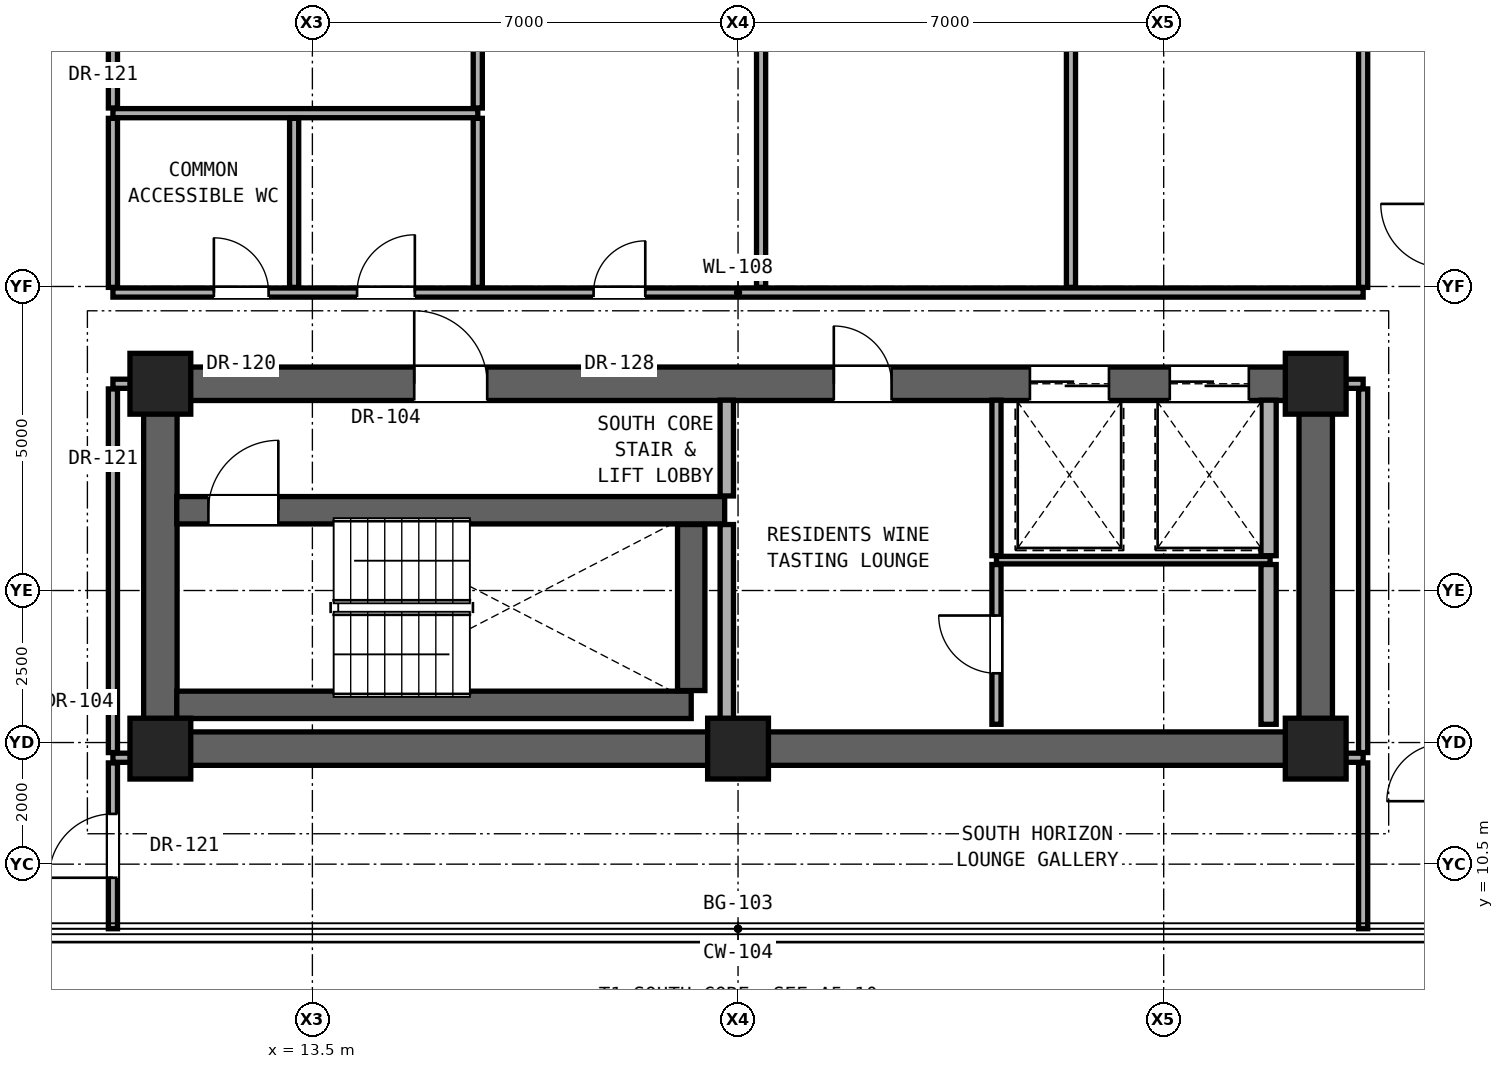
"""IFC4 building model, lengths in metres.
Left out: names, types, materials, properties, quantities, classifications, styles, units other than length and angle.
Written with IfcOpenShell. Run it as: python <this file> out.ifc"""

import sys

from ifc_helpers import new_model, si_unit, direction, frame, frame_2d, origin, origin_2d, place, context, subcontext, project, spatial, rectangle, extrude, element, fill, save


model = new_model("IFC4")
c1 = context("Model", 3, precision=1e-05, world=origin(), true_north=direction((0.0, 1.0)))
c2 = subcontext(c1, "Body", "Model", "MODEL_VIEW")
j1 = project(units=[si_unit("LENGTHUNIT", "METRE"), si_unit("PLANEANGLEUNIT", "RADIAN")], contexts=[c1])
p1 = place(None, origin())
s1 = spatial("IfcSite", under=j1, at=p1, CompositionType="ELEMENT")
p2 = place(p1, origin())
s2 = spatial("IfcBuilding", under=s1, at=p2, CompositionType="ELEMENT")
p3 = place(p2, frame((0.0, 0.0, 167.4)))
s3 = spatial("IfcBuildingStorey", under=s2, at=p3, CompositionType="ELEMENT", Elevation=167.4)
for number, where, z_axis, x_axis in (
    (1, (11.0, 12.4, 0.0), (0.0, 0.0, 1.0), (1.0, 0.0, 0.0)),
    (2, (20.5, 12.4, 0.0), (0.0, 0.0, 1.0), (1.0, 0.0, 0.0)),
    (3, (30.0, 12.4, 0.0), (0.0, 0.0, 1.0), (1.0, 0.0, 0.0)),
    (4, (11.0, 18.4, 0.0), (0.0, 0.0, 1.0), (1.0, 0.0, 0.0)),
    (5, (30.0, 18.4, 0.0), (0.0, 0.0, 1.0), (1.0, 0.0, 0.0)),
):
    element("IfcColumn", number, at=place(p3, frame(where, z_axis=z_axis, x_axis=x_axis)), inside=s3, PredefinedType="COLUMN", context=c2, shape_type="SweptSolid", body=[
        extrude(rectangle(XDim=1.0, YDim=1.0, at=origin_2d()), origin(), (0.0, 0.0, 1.0), 3.25),
    ])
p4 = place(p3, frame((11.0, 12.4, 0.0), z_axis=(0.0, 0.0, 1.0), x_axis=(1.0, 0.0, 0.0)))
e6 = element("IfcWall", 6, at=p4, inside=s3, PredefinedType="SHEAR", context=c2, shape_type="SweptSolid", body=[
    extrude(rectangle(XDim=19.0, YDim=0.55, at=frame_2d((9.5, 0.0))), origin(), (0.0, 0.0, 1.0), 3.05),
])
for number, where, z_axis, x_axis in (
    (7, (11.0, 12.4, 0.0), (0.0, 0.0, 1.0), (0.0, 1.0, 0.0)),
    (8, (30.0, 12.4, 0.0), (0.0, 0.0, 1.0), (0.0, 1.0, 0.0)),
):
    element("IfcWall", number, at=place(p3, frame(where, z_axis=z_axis, x_axis=x_axis)), inside=s3, PredefinedType="SHEAR", context=c2, shape_type="SweptSolid", body=[
        extrude(rectangle(XDim=6.0, YDim=0.55, at=frame_2d((3.0, 0.0))), origin(), (0.0, 0.0, 1.0), 3.05),
    ])
p5 = place(p3, frame((11.0, 18.4, 0.0), z_axis=(0.0, 0.0, 1.0), x_axis=(1.0, 0.0, 0.0)))
e9 = element("IfcWall", 9, at=p5, inside=s3, PredefinedType="SHEAR", context=c2, shape_type="SweptSolid", body=[
    extrude(rectangle(XDim=19.0, YDim=0.55, at=frame_2d((9.5, 0.0))), origin(), (0.0, 0.0, 1.0), 3.05),
])
p6 = place(p5, frame((4.175, 0.0, 0.0)))
e10 = element("IfcOpeningElement", 10, at=p6, cuts=e9, PredefinedType="OPENING", context=c2, shape_type="SweptSolid", body=[
    extrude(rectangle(XDim=1.2, YDim=2.25, at=frame_2d((0.6, 1.125))), frame((0.0, 0.285, 0.0), z_axis=(0.0, -1.0, 0.0), x_axis=(1.0, 0.0, 0.0)), (0.0, 0.0, 1.0), 0.57),
])
p7 = place(p5, frame((11.075, 0.0, 0.0)))
e11 = element("IfcOpeningElement", 11, at=p7, cuts=e9, PredefinedType="OPENING", context=c2, shape_type="SweptSolid", body=[
    extrude(rectangle(XDim=0.95, YDim=2.15, at=frame_2d((0.475, 1.075))), frame((0.0, 0.285, 0.0), z_axis=(0.0, -1.0, 0.0), x_axis=(1.0, 0.0, 0.0)), (0.0, 0.0, 1.0), 0.57),
])
p8 = place(p5, frame((14.3, 0.0, 0.0)))
e12 = element("IfcOpeningElement", 12, at=p8, cuts=e9, PredefinedType="OPENING", context=c2, shape_type="SweptSolid", body=[
    extrude(rectangle(XDim=1.3, YDim=2.3, at=frame_2d((0.65, 1.15))), frame((0.0, 0.285, 0.0), z_axis=(0.0, -1.0, 0.0), x_axis=(1.0, 0.0, 0.0)), (0.0, 0.0, 1.0), 0.57),
])
p9 = place(p5, frame((16.6, 0.0, 0.0)))
e13 = element("IfcOpeningElement", 13, at=p9, cuts=e9, PredefinedType="OPENING", context=c2, shape_type="SweptSolid", body=[
    extrude(rectangle(XDim=1.3, YDim=2.3, at=frame_2d((0.65, 1.15))), frame((0.0, 0.285, 0.0), z_axis=(0.0, -1.0, 0.0), x_axis=(1.0, 0.0, 0.0)), (0.0, 0.0, 1.0), 0.57),
])
for number, where, z_axis, x_axis in (
    (14, (10.22, 12.25, 0.0), (0.0, 0.0, 1.0), (1.0, 0.0, 0.0)),
    (15, (30.27, 12.25, 0.0), (0.0, 0.0, 1.0), (1.0, 0.0, 0.0)),
):
    element("IfcWall", number, at=place(p3, frame(where, z_axis=z_axis, x_axis=x_axis)), inside=s3, PredefinedType="PARTITIONING", context=c2, shape_type="SweptSolid", body=[
        extrude(rectangle(XDim=0.51, YDim=0.15, at=frame_2d((0.255, 0.0))), origin(), (0.0, 0.0, 1.0), 3.05),
    ])
p10 = place(p3, frame((11.27, 13.12, 0.0), z_axis=(0.0, 0.0, 1.0), x_axis=(1.0, 0.0, 0.0)))
e16 = element("IfcWall", 16, at=p10, inside=s3, PredefinedType="SHEAR", context=c2, shape_type="SweptSolid", body=[
    extrude(rectangle(XDim=8.46, YDim=0.45, at=frame_2d((4.23, 0.0))), origin(), (0.0, 0.0, 1.0), 3.05),
])
p11 = place(p3, frame((24.75, 15.5, 0.0), z_axis=(0.0, 0.0, 1.0), x_axis=(1.0, 0.0, 0.0)))
e17 = element("IfcWall", 17, at=p11, inside=s3, PredefinedType="PARTITIONING", context=c2, shape_type="SweptSolid", body=[
    extrude(rectangle(XDim=4.5, YDim=0.125, at=frame_2d((2.25, 0.0))), origin(), (0.0, 0.0, 1.0), 3.05),
])
p12 = place(p3, frame((11.27, 16.32, 0.0), z_axis=(0.0, 0.0, 1.0), x_axis=(1.0, 0.0, 0.0)))
e18 = element("IfcWall", 18, at=p12, inside=s3, PredefinedType="SHEAR", context=c2, shape_type="SweptSolid", body=[
    extrude(rectangle(XDim=9.01, YDim=0.45, at=frame_2d((4.505, 0.0))), origin(), (0.0, 0.0, 1.0), 3.05),
])
p13 = place(p12, frame((0.52, 0.0, 0.0)))
e19 = element("IfcOpeningElement", 19, at=p13, cuts=e18, PredefinedType="OPENING", context=c2, shape_type="SweptSolid", body=[
    extrude(rectangle(XDim=1.15, YDim=2.2, at=frame_2d((0.575, 1.1))), frame((0.0, 0.235, 0.0), z_axis=(0.0, -1.0, 0.0), x_axis=(1.0, 0.0, 0.0)), (0.0, 0.0, 1.0), 0.47),
])
for number, where, z_axis, x_axis in (
    (20, (10.22, 18.4, 0.0), (0.0, 0.0, 1.0), (1.0, 0.0, 0.0)),
    (21, (30.27, 18.4, 0.0), (0.0, 0.0, 1.0), (1.0, 0.0, 0.0)),
):
    element("IfcWall", number, at=place(p3, frame(where, z_axis=z_axis, x_axis=x_axis)), inside=s3, PredefinedType="PARTITIONING", context=c2, shape_type="SweptSolid", body=[
        extrude(rectangle(XDim=0.51, YDim=0.15, at=frame_2d((0.255, 0.0))), origin(), (0.0, 0.0, 1.0), 2.442),
    ])
p14 = place(p3, frame((10.22, 19.9, 0.0), z_axis=(0.0, 0.0, 1.0), x_axis=(1.0, 0.0, 0.0)))
e22 = element("IfcWall", 22, at=p14, inside=s3, PredefinedType="PARTITIONING", context=c2, shape_type="SweptSolid", body=[
    extrude(rectangle(XDim=20.56, YDim=0.15, at=frame_2d((10.28, 0.0))), origin(), (0.0, 0.0, 1.0), 2.186),
])
p15 = place(p14, frame((1.66, 0.0, 0.0)))
e23 = element("IfcOpeningElement", 23, at=p15, cuts=e22, PredefinedType="OPENING", context=c2, shape_type="SweptSolid", body=[
    extrude(rectangle(XDim=0.9, YDim=2.1, at=frame_2d((0.45, 1.05))), frame((0.0, 0.085, 0.0), z_axis=(0.0, -1.0, 0.0), x_axis=(1.0, 0.0, 0.0)), (0.0, 0.0, 1.0), 0.17),
])
p16 = place(p14, frame((4.015, 0.0, 0.0)))
e24 = element("IfcOpeningElement", 24, at=p16, cuts=e22, PredefinedType="OPENING", context=c2, shape_type="SweptSolid", body=[
    extrude(rectangle(XDim=0.95, YDim=2.15, at=frame_2d((0.475, 1.075))), frame((0.0, 0.085, 0.0), z_axis=(0.0, -1.0, 0.0), x_axis=(1.0, 0.0, 0.0)), (0.0, 0.0, 1.0), 0.17),
])
p17 = place(p14, frame((7.905, 0.0, 0.0)))
e25 = element("IfcOpeningElement", 25, at=p17, cuts=e22, PredefinedType="OPENING", context=c2, shape_type="SweptSolid", body=[
    extrude(rectangle(XDim=0.85, YDim=2.01, at=frame_2d((0.425, 1.005))), frame((0.0, 0.085, 0.0), z_axis=(0.0, -1.0, 0.0), x_axis=(1.0, 0.0, 0.0)), (0.0, 0.0, 1.0), 0.17),
])
p18 = place(p3, frame((10.22, 22.85, 0.0), z_axis=(0.0, 0.0, 1.0), x_axis=(1.0, 0.0, 0.0)))
e26 = element("IfcWall", 26, at=p18, inside=s3, PredefinedType="PARTITIONING", context=c2, shape_type="SweptSolid", body=[
    extrude(rectangle(XDim=6.0, YDim=0.15, at=frame_2d((3.0, 0.0))), origin(), (0.0, 0.0, 1.0), 2.186),
])
p19 = place(p3, frame((10.22, 9.438, 0.0), z_axis=(0.0, 0.0, 1.0), x_axis=(0.0, 1.0, 0.0)))
e27 = element("IfcWall", 27, at=p19, inside=s3, PredefinedType="PARTITIONING", context=c2, shape_type="SweptSolid", body=[
    extrude(rectangle(XDim=2.727, YDim=0.15, at=frame_2d((1.364, 0.0))), origin(), (0.0, 0.0, 1.0), 3.05),
])
p20 = place(p19, frame((0.838, 0.0, 0.0)))
e28 = element("IfcOpeningElement", 28, at=p20, cuts=e27, PredefinedType="OPENING", context=c2, shape_type="SweptSolid", body=[
    extrude(rectangle(XDim=1.05, YDim=2.2, at=frame_2d((0.525, 1.1))), frame((0.0, 0.085, 0.0), z_axis=(0.0, -1.0, 0.0), x_axis=(1.0, 0.0, 0.0)), (0.0, 0.0, 1.0), 0.17),
])
p21 = place(p3, frame((10.22, 12.335, 0.0), z_axis=(0.0, 0.0, 1.0), x_axis=(0.0, 1.0, 0.0)))
e29 = element("IfcWall", 29, at=p21, inside=s3, PredefinedType="PARTITIONING", context=c2, shape_type="SweptSolid", body=[
    extrude(rectangle(XDim=5.98, YDim=0.15, at=frame_2d((2.99, 0.0))), origin(), (0.0, 0.0, 1.0), 2.442),
])
p22 = place(p3, frame((10.22, 19.985, 0.0), z_axis=(0.0, 0.0, 1.0), x_axis=(0.0, 1.0, 0.0)))
e30 = element("IfcWall", 30, at=p22, inside=s3, PredefinedType="PARTITIONING", context=c2, shape_type="SweptSolid", body=[
    extrude(rectangle(XDim=2.78, YDim=0.15, at=frame_2d((1.39, 0.0))), origin(), (0.0, 0.0, 1.0), 3.05),
])
p23 = place(p3, frame((10.22, 22.935, 0.0), z_axis=(0.0, 0.0, 1.0), x_axis=(0.0, 1.0, 0.0)))
e31 = element("IfcWall", 31, at=p23, inside=s3, PredefinedType="PARTITIONING", context=c2, shape_type="SweptSolid", body=[
    extrude(rectangle(XDim=10.08, YDim=0.15, at=frame_2d((5.04, 0.0))), origin(), (0.0, 0.0, 1.0), 2.346),
])
p24 = place(p23, frame((4.565, 0.0, 0.0)))
e32 = element("IfcOpeningElement", 32, at=p24, cuts=e31, PredefinedType="OPENING", context=c2, shape_type="SweptSolid", body=[
    extrude(rectangle(XDim=0.95, YDim=2.15, at=frame_2d((0.475, 1.075))), frame((0.0, 0.085, 0.0), z_axis=(0.0, -1.0, 0.0), x_axis=(1.0, 0.0, 0.0)), (0.0, 0.0, 1.0), 0.17),
])
for number, where, z_axis, x_axis in (
    (33, (13.2, 19.985, 0.0), (0.0, 0.0, 1.0), (0.0, 1.0, 0.0)),
    (34, (16.22, 19.985, 0.0), (0.0, 0.0, 1.0), (0.0, 1.0, 0.0)),
):
    element("IfcWall", number, at=place(p3, frame(where, z_axis=z_axis, x_axis=x_axis)), inside=s3, PredefinedType="PARTITIONING", context=c2, shape_type="SweptSolid", body=[
        extrude(rectangle(XDim=2.78, YDim=0.15, at=frame_2d((1.39, 0.0))), origin(), (0.0, 0.0, 1.0), 3.05),
    ])
p25 = place(p3, frame((16.22, 22.935, 0.0), z_axis=(0.0, 0.0, 1.0), x_axis=(0.0, 1.0, 0.0)))
e35 = element("IfcWall", 35, at=p25, inside=s3, PredefinedType="PARTITIONING", context=c2, shape_type="SweptSolid", body=[
    extrude(rectangle(XDim=10.08, YDim=0.15, at=frame_2d((5.04, 0.0))), origin(), (0.0, 0.0, 1.0), 2.186),
])
p26 = place(p3, frame((19.73, 13.355, 0.0), z_axis=(0.0, 0.0, 1.0), x_axis=(0.0, 1.0, 0.0)))
e36 = element("IfcWall", 36, at=p26, inside=s3, PredefinedType="SHEAR", context=c2, shape_type="SweptSolid", body=[
    extrude(rectangle(XDim=2.73, YDim=0.45, at=frame_2d((1.365, 0.0))), origin(), (0.0, 0.0, 1.0), 3.05),
])
p27 = place(p3, frame((20.315, 12.8, 0.0), z_axis=(0.0, 0.0, 1.0), x_axis=(0.0, 1.0, 0.0)))
e37 = element("IfcWall", 37, at=p27, inside=s3, PredefinedType="SOLIDWALL", context=c2, shape_type="SweptSolid", body=[
    extrude(rectangle(XDim=3.285, YDim=0.22, at=frame_2d((1.643, 0.0))), origin(), (0.0, 0.0, 1.0), 3.05),
])
p28 = place(p3, frame((20.315, 16.555, 0.0), z_axis=(0.0, 0.0, 1.0), x_axis=(0.0, 1.0, 0.0)))
e38 = element("IfcWall", 38, at=p28, inside=s3, PredefinedType="SOLIDWALL", context=c2, shape_type="SweptSolid", body=[
    extrude(rectangle(XDim=1.575, YDim=0.22, at=frame_2d((0.788, 0.0))), origin(), (0.0, 0.0, 1.0), 3.05),
])
p29 = place(p3, frame((20.879, 19.985, 0.0), z_axis=(0.0, 0.0, 1.0), x_axis=(0.0, 1.0, 0.0)))
e39 = element("IfcWall", 39, at=p29, inside=s3, PredefinedType="PARTITIONING", context=c2, shape_type="SweptSolid", body=[
    extrude(rectangle(XDim=13.03, YDim=0.15, at=frame_2d((6.515, 0.0))), origin(), (0.0, 0.0, 1.0), 2.186),
])
p30 = place(p3, frame((24.75, 12.8, 0.0), z_axis=(0.0, 0.0, 1.0), x_axis=(0.0, 1.0, 0.0)))
e40 = element("IfcWall", 40, at=p30, inside=s3, PredefinedType="PARTITIONING", context=c2, shape_type="SweptSolid", body=[
    extrude(rectangle(XDim=2.627, YDim=0.15, at=frame_2d((1.314, 0.0))), origin(), (0.0, 0.0, 1.0), 3.05),
])
p31 = place(p30, frame((0.839, 0.0, 0.0)))
e41 = element("IfcOpeningElement", 41, at=p31, cuts=e40, PredefinedType="OPENING", context=c2, shape_type="SweptSolid", body=[
    extrude(rectangle(XDim=0.95, YDim=2.15, at=frame_2d((0.475, 1.075))), frame((0.0, 0.085, 0.0), z_axis=(0.0, -1.0, 0.0), x_axis=(1.0, 0.0, 0.0)), (0.0, 0.0, 1.0), 0.17),
])
p32 = place(p3, frame((24.75, 15.573, 0.0), z_axis=(0.0, 0.0, 1.0), x_axis=(0.0, 1.0, 0.0)))
e42 = element("IfcWall", 42, at=p32, inside=s3, PredefinedType="PARTITIONING", context=c2, shape_type="SweptSolid", body=[
    extrude(rectangle(XDim=2.557, YDim=0.15, at=frame_2d((1.279, 0.0))), origin(), (0.0, 0.0, 1.0), 3.05),
])
p33 = place(p3, frame((25.975, 19.985, 0.0), z_axis=(0.0, 0.0, 1.0), x_axis=(0.0, 1.0, 0.0)))
e43 = element("IfcWall", 43, at=p33, inside=s3, PredefinedType="PARTITIONING", context=c2, shape_type="SweptSolid", body=[
    extrude(rectangle(XDim=13.03, YDim=0.15, at=frame_2d((6.515, 0.0))), origin(), (0.0, 0.0, 1.0), 2.186),
])
p34 = place(p3, frame((29.225, 12.8, 0.0), z_axis=(0.0, 0.0, 1.0), x_axis=(0.0, 1.0, 0.0)))
e44 = element("IfcWall", 44, at=p34, inside=s3, PredefinedType="SOLIDWALL", context=c2, shape_type="SweptSolid", body=[
    extrude(rectangle(XDim=2.627, YDim=0.25, at=frame_2d((1.314, 0.0))), origin(), (0.0, 0.0, 1.0), 3.05),
])
p35 = place(p3, frame((29.225, 15.573, 0.0), z_axis=(0.0, 0.0, 1.0), x_axis=(0.0, 1.0, 0.0)))
e45 = element("IfcWall", 45, at=p35, inside=s3, PredefinedType="SOLIDWALL", context=c2, shape_type="SweptSolid", body=[
    extrude(rectangle(XDim=2.557, YDim=0.25, at=frame_2d((1.279, 0.0))), origin(), (0.0, 0.0, 1.0), 3.05),
])
p36 = place(p3, frame((30.78, 9.438, 0.0), z_axis=(0.0, 0.0, 1.0), x_axis=(0.0, 1.0, 0.0)))
e46 = element("IfcWall", 46, at=p36, inside=s3, PredefinedType="PARTITIONING", context=c2, shape_type="SweptSolid", body=[
    extrude(rectangle(XDim=2.727, YDim=0.15, at=frame_2d((1.364, 0.0))), origin(), (0.0, 0.0, 1.0), 3.05),
])
p37 = place(p3, frame((30.78, 12.335, 0.0), z_axis=(0.0, 0.0, 1.0), x_axis=(0.0, 1.0, 0.0)))
e47 = element("IfcWall", 47, at=p37, inside=s3, PredefinedType="PARTITIONING", context=c2, shape_type="SweptSolid", body=[
    extrude(rectangle(XDim=5.98, YDim=0.15, at=frame_2d((2.99, 0.0))), origin(), (0.0, 0.0, 1.0), 2.442),
])
p38 = place(p3, frame((30.78, 19.985, 0.0), z_axis=(0.0, 0.0, 1.0), x_axis=(0.0, 1.0, 0.0)))
e48 = element("IfcWall", 48, at=p38, inside=s3, PredefinedType="PARTITIONING", context=c2, shape_type="SweptSolid", body=[
    extrude(rectangle(XDim=13.03, YDim=0.15, at=frame_2d((6.515, 0.0))), origin(), (0.0, 0.0, 1.0), 2.346),
])
p39 = place(p6, origin())
e49 = element("IfcDoor", 49, at=p39, inside=s3, OperationType="SINGLE_SWING_LEFT", PredefinedType="DOOR", context=c2, shape_type="SweptSolid", body=[
    extrude(rectangle(XDim=1.2, YDim=2.25, at=frame_2d((0.6, 1.125))), frame((0.0, 0.025, 0.0), z_axis=(0.0, -1.0, 0.0), x_axis=(1.0, 0.0, 0.0)), (0.0, 0.0, 1.0), 0.05),
])
fill(e10, e49)
p40 = place(p13, origin())
e50 = element("IfcDoor", 50, at=p40, inside=s3, OperationType="SINGLE_SWING_RIGHT", PredefinedType="DOOR", context=c2, shape_type="SweptSolid", body=[
    extrude(rectangle(XDim=1.15, YDim=2.2, at=frame_2d((0.575, 1.1))), frame((0.0, 0.025, 0.0), z_axis=(0.0, -1.0, 0.0), x_axis=(1.0, 0.0, 0.0)), (0.0, 0.0, 1.0), 0.05),
])
fill(e19, e50)
p41 = place(p7, origin())
e51 = element("IfcDoor", 51, at=p41, inside=s3, OperationType="SINGLE_SWING_LEFT", PredefinedType="DOOR", context=c2, shape_type="SweptSolid", body=[
    extrude(rectangle(XDim=0.95, YDim=2.15, at=frame_2d((0.475, 1.075))), frame((0.0, 0.025, 0.0), z_axis=(0.0, -1.0, 0.0), x_axis=(1.0, 0.0, 0.0)), (0.0, 0.0, 1.0), 0.05),
])
fill(e11, e51)
p42 = place(p31, origin())
e52 = element("IfcDoor", 52, at=p42, inside=s3, OperationType="SINGLE_SWING_RIGHT", PredefinedType="DOOR", context=c2, shape_type="SweptSolid", body=[
    extrude(rectangle(XDim=0.95, YDim=2.15, at=frame_2d((0.475, 1.075))), frame((0.0, 0.025, 0.0), z_axis=(0.0, -1.0, 0.0), x_axis=(1.0, 0.0, 0.0)), (0.0, 0.0, 1.0), 0.05),
])
fill(e41, e52)
p43 = place(p15, origin())
e53 = element("IfcDoor", 53, at=p43, inside=s3, OperationType="SINGLE_SWING_LEFT", PredefinedType="DOOR", context=c2, shape_type="SweptSolid", body=[
    extrude(rectangle(XDim=0.9, YDim=2.1, at=frame_2d((0.45, 1.05))), frame((0.0, 0.025, 0.0), z_axis=(0.0, -1.0, 0.0), x_axis=(1.0, 0.0, 0.0)), (0.0, 0.0, 1.0), 0.05),
])
fill(e23, e53)
p44 = place(p16, origin())
e54 = element("IfcDoor", 54, at=p44, inside=s3, OperationType="SINGLE_SWING_RIGHT", PredefinedType="DOOR", context=c2, shape_type="SweptSolid", body=[
    extrude(rectangle(XDim=0.95, YDim=2.15, at=frame_2d((0.475, 1.075))), frame((0.0, 0.025, 0.0), z_axis=(0.0, -1.0, 0.0), x_axis=(1.0, 0.0, 0.0)), (0.0, 0.0, 1.0), 0.05),
])
fill(e24, e54)
p45 = place(p17, origin())
e55 = element("IfcDoor", 55, at=p45, inside=s3, OperationType="SINGLE_SWING_RIGHT", PredefinedType="DOOR", context=c2, shape_type="SweptSolid", body=[
    extrude(rectangle(XDim=0.85, YDim=2.01, at=frame_2d((0.425, 1.005))), frame((0.0, 0.025, 0.0), z_axis=(0.0, -1.0, 0.0), x_axis=(1.0, 0.0, 0.0)), (0.0, 0.0, 1.0), 0.05),
])
fill(e25, e55)
p46 = place(p20, origin())
e56 = element("IfcDoor", 56, at=p46, inside=s3, OperationType="SINGLE_SWING_LEFT", PredefinedType="DOOR", context=c2, shape_type="SweptSolid", body=[
    extrude(rectangle(XDim=1.05, YDim=2.2, at=frame_2d((0.525, 1.1))), frame((0.0, 0.025, 0.0), z_axis=(0.0, -1.0, 0.0), x_axis=(1.0, 0.0, 0.0)), (0.0, 0.0, 1.0), 0.05),
])
fill(e28, e56)
p47 = place(p8, origin())
e57 = element("IfcDoor", 57, at=p47, inside=s3, OperationType="DOUBLE_DOOR_SLIDING", PredefinedType="DOOR", context=c2, shape_type="SweptSolid", body=[
    extrude(rectangle(XDim=1.3, YDim=2.3, at=frame_2d((0.65, 1.15))), frame((0.0, 0.025, 0.0), z_axis=(0.0, -1.0, 0.0), x_axis=(1.0, 0.0, 0.0)), (0.0, 0.0, 1.0), 0.05),
])
fill(e12, e57)
p48 = place(p9, origin())
e58 = element("IfcDoor", 58, at=p48, inside=s3, OperationType="DOUBLE_DOOR_SLIDING", PredefinedType="DOOR", context=c2, shape_type="SweptSolid", body=[
    extrude(rectangle(XDim=1.3, YDim=2.3, at=frame_2d((0.65, 1.15))), frame((0.0, 0.025, 0.0), z_axis=(0.0, -1.0, 0.0), x_axis=(1.0, 0.0, 0.0)), (0.0, 0.0, 1.0), 0.05),
])
fill(e13, e58)
save(model, sys.argv[1])
